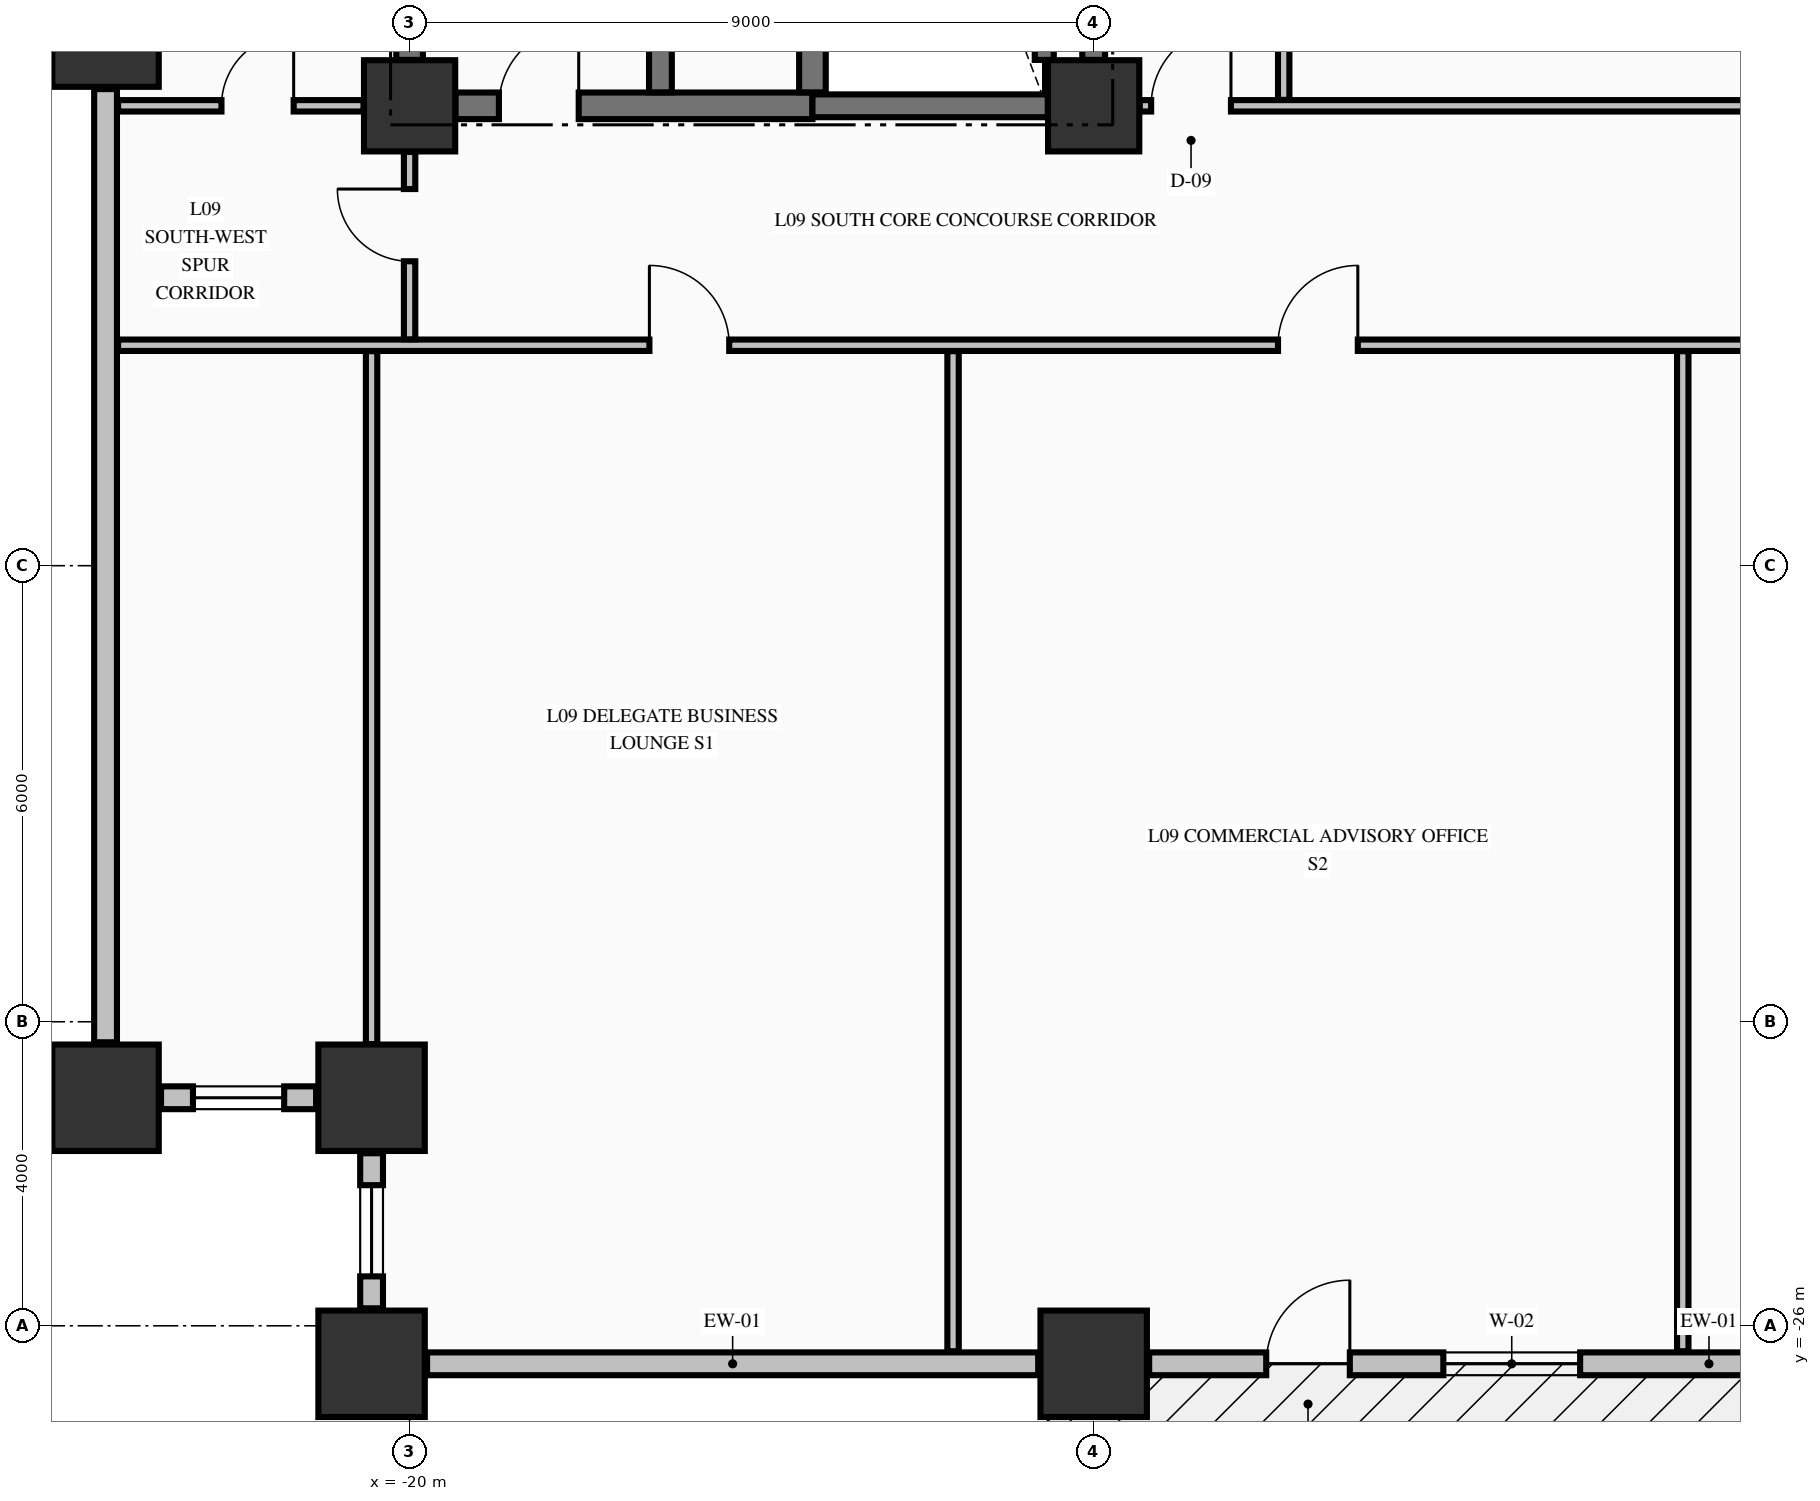
"""IFC4 building model, lengths in metres.
Left out: names, types, materials, properties, quantities, classifications, styles, units other than length and angle.
Written with IfcOpenShell. Run it as: python <this file> out.ifc"""

import sys

from ifc_helpers import new_model, si_unit, direction, frame, frame_2d, origin, origin_2d, place, context, subcontext, project, spatial, rectangle, extrude, element, fill, save


model = new_model("IFC4")
c1 = context("Model", 3, precision=1e-05, world=origin(), true_north=direction((0.0, 1.0)))
c2 = subcontext(c1, "Body", "Model", "MODEL_VIEW")
j1 = project(units=[si_unit("LENGTHUNIT", "METRE"), si_unit("PLANEANGLEUNIT", "RADIAN")], contexts=[c1])
p1 = place(None, origin())
s1 = spatial("IfcSite", under=j1, at=p1, CompositionType="ELEMENT")
p2 = place(p1, origin())
s2 = spatial("IfcBuilding", under=s1, at=p2, CompositionType="ELEMENT")
p3 = place(p2, frame((0.0, 0.0, 41.48)))
s3 = spatial("IfcBuildingStorey", under=s2, at=p3, CompositionType="ELEMENT", Elevation=41.48)
for number, where, z_axis, x_axis in (
    (1, (-20.5, -26.5, -0.25), (0.0, 0.0, 1.0), (1.0, 0.0, 0.0)),
    (2, (-11.0, -26.5, -0.25), (0.0, 0.0, 1.0), (1.0, 0.0, 0.0)),
    (3, (-24.0, -23.0, -0.25), (0.0, 0.0, 1.0), (1.0, 0.0, 0.0)),
    (4, (-24.0, -9.0, -0.25), (0.0, 0.0, 1.0), (1.0, 0.0, 0.0)),
    (5, (-20.5, -23.0, -0.25), (0.0, 0.0, 1.0), (1.0, 0.0, 0.0)),
):
    element("IfcColumn", number, at=place(p3, frame(where, z_axis=z_axis, x_axis=x_axis)), inside=s3, PredefinedType="COLUMN", context=c2, shape_type="SweptSolid", body=[
        extrude(rectangle(XDim=1.4, YDim=1.4, at=origin_2d()), origin(), (0.0, 0.0, 1.0), 3.57),
    ])
for number, where, z_axis, x_axis in (
    (6, (-20.0, -9.95, -0.25), (0.0, 0.0, 1.0), (1.0, 0.0, 0.0)),
    (7, (-11.0, -9.95, -0.25), (0.0, 0.0, 1.0), (1.0, 0.0, 0.0)),
):
    element("IfcColumn", number, at=place(p3, frame(where, z_axis=z_axis, x_axis=x_axis)), inside=s3, PredefinedType="COLUMN", context=c2, shape_type="SweptSolid", body=[
        extrude(rectangle(XDim=1.2, YDim=1.2, at=origin_2d()), origin(), (0.0, 0.0, 1.0), 3.57),
    ])
p4 = place(p3, frame((-23.27, -23.0, 0.0), z_axis=(0.0, 0.0, 1.0), x_axis=(1.0, 0.0, 0.0)))
e8 = element("IfcWall", 8, at=p4, inside=s3, PredefinedType="STANDARD", context=c2, shape_type="SweptSolid", body=[
    extrude(rectangle(XDim=2.04, YDim=0.3, at=frame_2d((1.02, 0.0))), origin(), (0.0, 0.0, 1.0), 2.712),
])
p5 = place(p4, frame((0.42, 0.0, 0.82)))
e9 = element("IfcOpeningElement", 9, at=p5, cuts=e8, PredefinedType="OPENING", context=c2, shape_type="SweptSolid", body=[
    extrude(rectangle(XDim=1.2, YDim=1.65, at=frame_2d((0.6, 0.825))), frame((0.0, 0.16, 0.0), z_axis=(0.0, -1.0, 0.0), x_axis=(1.0, 0.0, 0.0)), (0.0, 0.0, 1.0), 0.32),
])
p6 = place(p3, frame((-20.5, -23.73, 0.0), z_axis=(0.0, 0.0, 1.0), x_axis=(0.0, -1.0, 0.0)))
e10 = element("IfcWall", 10, at=p6, inside=s3, PredefinedType="STANDARD", context=c2, shape_type="SweptSolid", body=[
    extrude(rectangle(XDim=2.04, YDim=0.3, at=frame_2d((1.02, 0.0))), origin(), (0.0, 0.0, 1.0), 2.712),
])
p7 = place(p6, frame((0.42, 0.0, 0.82)))
e11 = element("IfcOpeningElement", 11, at=p7, cuts=e10, PredefinedType="OPENING", context=c2, shape_type="SweptSolid", body=[
    extrude(rectangle(XDim=1.2, YDim=1.65, at=frame_2d((0.6, 0.825))), frame((0.0, 0.16, 0.0), z_axis=(0.0, -1.0, 0.0), x_axis=(1.0, 0.0, 0.0)), (0.0, 0.0, 1.0), 0.32),
])
p8 = place(p3, frame((-19.77, -26.5, 0.0), z_axis=(0.0, 0.0, 1.0), x_axis=(1.0, 0.0, 0.0)))
e12 = element("IfcWall", 12, at=p8, inside=s3, PredefinedType="STANDARD", context=c2, shape_type="SweptSolid", body=[
    extrude(rectangle(XDim=8.04, YDim=0.3, at=frame_2d((4.02, 0.0))), origin(), (0.0, 0.0, 1.0), 2.712),
])
p9 = place(p3, frame((-10.27, -26.5, 0.0), z_axis=(0.0, 0.0, 1.0), x_axis=(1.0, 0.0, 0.0)))
e13 = element("IfcWall", 13, at=p9, inside=s3, PredefinedType="STANDARD", context=c2, shape_type="SweptSolid", body=[
    extrude(rectangle(XDim=9.54, YDim=0.3, at=frame_2d((4.77, 0.0))), origin(), (0.0, 0.0, 1.0), 2.712),
])
p10 = place(p9, frame((1.54, 0.0, 0.0)))
e14 = element("IfcOpeningElement", 14, at=p10, cuts=e13, PredefinedType="OPENING", context=c2, shape_type="SweptSolid", body=[
    extrude(rectangle(XDim=1.1, YDim=2.15, at=frame_2d((0.55, 1.075))), frame((0.0, 0.16, 0.0), z_axis=(0.0, -1.0, 0.0), x_axis=(1.0, 0.0, 0.0)), (0.0, 0.0, 1.0), 0.32),
])
p11 = place(p9, frame((3.87, 0.0, 0.78)))
e15 = element("IfcOpeningElement", 15, at=p11, cuts=e13, PredefinedType="OPENING", context=c2, shape_type="SweptSolid", body=[
    extrude(rectangle(XDim=1.8, YDim=1.72, at=frame_2d((0.9, 0.86))), frame((0.0, 0.16, 0.0), z_axis=(0.0, -1.0, 0.0), x_axis=(1.0, 0.0, 0.0)), (0.0, 0.0, 1.0), 0.32),
])
p12 = place(p3, frame((-24.0, -9.73, 0.0), z_axis=(0.0, 0.0, 1.0), x_axis=(0.0, -1.0, 0.0)))
e16 = element("IfcWall", 16, at=p12, inside=s3, PredefinedType="STANDARD", context=c2, shape_type="SweptSolid", body=[
    extrude(rectangle(XDim=12.54, YDim=0.3, at=frame_2d((6.27, 0.0))), origin(), (0.0, 0.0, 1.0), 2.712),
])
p13 = place(p3, frame((-19.396, -9.95, 0.0), z_axis=(0.0, 0.0, 1.0), x_axis=(1.0, 0.0, 0.0)))
e17 = element("IfcWall", 17, at=p13, inside=s3, PredefinedType="SHEAR", context=c2, shape_type="SweptSolid", body=[
    extrude(rectangle(XDim=4.696, YDim=0.35, at=frame_2d((2.348, 0.0))), origin(), (0.0, 0.0, 1.0), 3.32),
])
p14 = place(p13, frame((0.571, 0.0, 0.0)))
e18 = element("IfcOpeningElement", 18, at=p14, cuts=e17, PredefinedType="OPENING", context=c2, shape_type="SweptSolid", body=[
    extrude(rectangle(XDim=1.05, YDim=2.15, at=frame_2d((0.525, 1.075))), frame((0.0, 0.185, 0.0), z_axis=(0.0, -1.0, 0.0), x_axis=(1.0, 0.0, 0.0)), (0.0, 0.0, 1.0), 0.37),
])
p15 = place(p3, frame((-14.7, -9.95, 0.0), z_axis=(0.0, 0.0, 1.0), x_axis=(1.0, 0.0, 0.0)))
e19 = element("IfcWall", 19, at=p15, inside=s3, PredefinedType="SHEAR", context=c2, shape_type="SweptSolid", body=[
    extrude(rectangle(XDim=3.096, YDim=0.3, at=frame_2d((1.548, 0.0))), origin(), (0.0, 0.0, 1.0), 3.32),
])
p16 = place(p3, frame((-23.835, -13.1, 0.0), z_axis=(0.0, 0.0, 1.0), x_axis=(1.0, 0.0, 0.0)))
e20 = element("IfcWall", 20, at=p16, inside=s3, PredefinedType="PARTITIONING", context=c2, shape_type="SweptSolid", body=[
    extrude(rectangle(XDim=52.67, YDim=0.15, at=frame_2d((26.335, 0.0))), origin(), (0.0, 0.0, 1.0), 3.32),
])
p17 = place(p16, frame((6.99, 0.0, 0.0)))
e21 = element("IfcOpeningElement", 21, at=p17, cuts=e20, PredefinedType="OPENING", context=c2, shape_type="SweptSolid", body=[
    extrude(rectangle(XDim=1.05, YDim=2.15, at=frame_2d((0.525, 1.075))), frame((0.0, 0.085, 0.0), z_axis=(0.0, -1.0, 0.0), x_axis=(1.0, 0.0, 0.0)), (0.0, 0.0, 1.0), 0.17),
])
p18 = place(p16, frame((15.26, 0.0, 0.0)))
e22 = element("IfcOpeningElement", 22, at=p18, cuts=e20, PredefinedType="OPENING", context=c2, shape_type="SweptSolid", body=[
    extrude(rectangle(XDim=1.05, YDim=2.15, at=frame_2d((0.525, 1.075))), frame((0.0, 0.085, 0.0), z_axis=(0.0, -1.0, 0.0), x_axis=(1.0, 0.0, 0.0)), (0.0, 0.0, 1.0), 0.17),
])
p19 = place(p16, frame((25.06, 0.0, 0.0)))
e23 = element("IfcOpeningElement", 23, at=p19, cuts=e20, PredefinedType="OPENING", context=c2, shape_type="SweptSolid", body=[
    extrude(rectangle(XDim=1.05, YDim=2.15, at=frame_2d((0.525, 1.075))), frame((0.0, 0.085, 0.0), z_axis=(0.0, -1.0, 0.0), x_axis=(1.0, 0.0, 0.0)), (0.0, 0.0, 1.0), 0.17),
])
p20 = place(p16, frame((36.59, 0.0, 0.0)))
e24 = element("IfcOpeningElement", 24, at=p20, cuts=e20, PredefinedType="OPENING", context=c2, shape_type="SweptSolid", body=[
    extrude(rectangle(XDim=1.05, YDim=2.15, at=frame_2d((0.525, 1.075))), frame((0.0, 0.085, 0.0), z_axis=(0.0, -1.0, 0.0), x_axis=(1.0, 0.0, 0.0)), (0.0, 0.0, 1.0), 0.17),
])
p21 = place(p3, frame((-23.835, -9.95, 0.0), z_axis=(0.0, 0.0, 1.0), x_axis=(1.0, 0.0, 0.0)))
e25 = element("IfcWall", 25, at=p21, inside=s3, PredefinedType="PARTITIONING", context=c2, shape_type="SweptSolid", body=[
    extrude(rectangle(XDim=3.229, YDim=0.15, at=frame_2d((1.615, 0.0))), origin(), (0.0, 0.0, 1.0), 3.32),
])
p22 = place(p21, frame((1.36, 0.0, 0.0)))
e26 = element("IfcOpeningElement", 26, at=p22, cuts=e25, PredefinedType="OPENING", context=c2, shape_type="SweptSolid", body=[
    extrude(rectangle(XDim=0.95, YDim=2.15, at=frame_2d((0.475, 1.075))), frame((0.0, 0.085, 0.0), z_axis=(0.0, -1.0, 0.0), x_axis=(1.0, 0.0, 0.0)), (0.0, 0.0, 1.0), 0.17),
])
p23 = place(p3, frame((-10.394, -9.95, 0.0), z_axis=(0.0, 0.0, 1.0), x_axis=(1.0, 0.0, 0.0)))
e27 = element("IfcWall", 27, at=p23, inside=s3, PredefinedType="PARTITIONING", context=c2, shape_type="SweptSolid", body=[
    extrude(rectangle(XDim=20.788, YDim=0.15, at=frame_2d((10.394, 0.0))), origin(), (0.0, 0.0, 1.0), 3.32),
])
p24 = place(p23, frame((0.15, 0.0, 0.0)))
e28 = element("IfcOpeningElement", 28, at=p24, cuts=e27, PredefinedType="OPENING", context=c2, shape_type="SweptSolid", body=[
    extrude(rectangle(XDim=1.05, YDim=2.15, at=frame_2d((0.525, 1.075))), frame((0.0, 0.085, 0.0), z_axis=(0.0, -1.0, 0.0), x_axis=(1.0, 0.0, 0.0)), (0.0, 0.0, 1.0), 0.17),
])
p25 = place(p23, frame((19.588, 0.0, 0.0)))
e29 = element("IfcOpeningElement", 29, at=p25, cuts=e27, PredefinedType="OPENING", context=c2, shape_type="SweptSolid", body=[
    extrude(rectangle(XDim=1.05, YDim=2.15, at=frame_2d((0.525, 1.075))), frame((0.0, 0.085, 0.0), z_axis=(0.0, -1.0, 0.0), x_axis=(1.0, 0.0, 0.0)), (0.0, 0.0, 1.0), 0.17),
])
p26 = place(p23, frame((12.669, 0.0, 0.0)))
e30 = element("IfcOpeningElement", 30, at=p26, cuts=e27, PredefinedType="OPENING", context=c2, shape_type="SweptSolid", body=[
    extrude(rectangle(XDim=0.95, YDim=2.15, at=frame_2d((0.475, 1.075))), frame((0.0, 0.085, 0.0), z_axis=(0.0, -1.0, 0.0), x_axis=(1.0, 0.0, 0.0)), (0.0, 0.0, 1.0), 0.17),
])
p27 = place(p3, frame((-20.0, -9.346, 0.0), z_axis=(0.0, 0.0, 1.0), x_axis=(0.0, 1.0, 0.0)))
e31 = element("IfcWall", 31, at=p27, inside=s3, PredefinedType="SHEAR", context=c2, shape_type="SweptSolid", body=[
    extrude(rectangle(XDim=8.742, YDim=0.35, at=frame_2d((4.371, 0.0))), origin(), (0.0, 0.0, 1.0), 3.32),
])
p28 = place(p3, frame((-16.7, -9.773, 0.0), z_axis=(0.0, 0.0, 1.0), x_axis=(0.0, 1.0, 0.0)))
e32 = element("IfcWall", 32, at=p28, inside=s3, PredefinedType="SHEAR", context=c2, shape_type="SweptSolid", body=[
    extrude(rectangle(XDim=9.371, YDim=0.3, at=frame_2d((4.686, 0.0))), origin(), (0.0, 0.0, 1.0), 3.32),
])
p29 = place(p3, frame((-14.7, -9.773, 0.0), z_axis=(0.0, 0.0, 1.0), x_axis=(0.0, 1.0, 0.0)))
e33 = element("IfcWall", 33, at=p29, inside=s3, PredefinedType="SHEAR", context=c2, shape_type="SweptSolid", body=[
    extrude(rectangle(XDim=9.371, YDim=0.35, at=frame_2d((4.686, 0.0))), origin(), (0.0, 0.0, 1.0), 3.32),
])
p30 = place(p3, frame((-11.65, -9.346, 0.0), z_axis=(0.0, 0.0, 1.0), x_axis=(0.0, 1.0, 0.0)))
e34 = element("IfcWall", 34, at=p30, inside=s3, PredefinedType="SOLIDWALL", context=c2, shape_type="SweptSolid", body=[
    extrude(rectangle(XDim=8.742, YDim=0.25, at=frame_2d((4.371, 0.0))), origin(), (0.0, 0.0, 1.0), 3.32),
])
p31 = place(p3, frame((-11.0, -9.346, 0.0), z_axis=(0.0, 0.0, 1.0), x_axis=(0.0, 1.0, 0.0)))
e35 = element("IfcWall", 35, at=p31, inside=s3, PredefinedType="SHEAR", context=c2, shape_type="SweptSolid", body=[
    extrude(rectangle(XDim=8.742, YDim=0.3, at=frame_2d((4.371, 0.0))), origin(), (0.0, 0.0, 1.0), 3.32),
])
p32 = place(p3, frame((-20.5, -22.294, 0.0), z_axis=(0.0, 0.0, 1.0), x_axis=(0.0, 1.0, 0.0)))
e36 = element("IfcWall", 36, at=p32, inside=s3, PredefinedType="PARTITIONING", context=c2, shape_type="SweptSolid", body=[
    extrude(rectangle(XDim=9.116, YDim=0.15, at=frame_2d((4.558, 0.0))), origin(), (0.0, 0.0, 1.0), 3.32),
])
p33 = place(p3, frame((-20.0, -13.022, 0.0), z_axis=(0.0, 0.0, 1.0), x_axis=(0.0, 1.0, 0.0)))
e37 = element("IfcWall", 37, at=p33, inside=s3, PredefinedType="PARTITIONING", context=c2, shape_type="SweptSolid", body=[
    extrude(rectangle(XDim=2.466, YDim=0.15, at=frame_2d((1.233, 0.0))), origin(), (0.0, 0.0, 1.0), 3.32),
])
p34 = place(p33, frame((1.027, 0.0, 0.0)))
e38 = element("IfcOpeningElement", 38, at=p34, cuts=e37, PredefinedType="OPENING", context=c2, shape_type="SweptSolid", body=[
    extrude(rectangle(XDim=0.95, YDim=2.15, at=frame_2d((0.475, 1.075))), frame((0.0, 0.085, 0.0), z_axis=(0.0, -1.0, 0.0), x_axis=(1.0, 0.0, 0.0)), (0.0, 0.0, 1.0), 0.17),
])
p35 = place(p3, frame((-12.85, -26.335, 0.0), z_axis=(0.0, 0.0, 1.0), x_axis=(0.0, 1.0, 0.0)))
e39 = element("IfcWall", 39, at=p35, inside=s3, PredefinedType="PARTITIONING", context=c2, shape_type="SweptSolid", body=[
    extrude(rectangle(XDim=13.157, YDim=0.15, at=frame_2d((6.579, 0.0))), origin(), (0.0, 0.0, 1.0), 3.32),
])
p36 = place(p3, frame((-8.5, -9.872, 0.0), z_axis=(0.0, 0.0, 1.0), x_axis=(0.0, 1.0, 0.0)))
e40 = element("IfcWall", 40, at=p36, inside=s3, PredefinedType="PARTITIONING", context=c2, shape_type="SweptSolid", body=[
    extrude(rectangle(XDim=13.369, YDim=0.15, at=frame_2d((6.685, 0.0))), origin(), (0.0, 0.0, 1.0), 3.32),
])
p37 = place(p36, frame((6.227, 0.0, 0.0)))
e41 = element("IfcOpeningElement", 41, at=p37, cuts=e40, PredefinedType="OPENING", context=c2, shape_type="SweptSolid", body=[
    extrude(rectangle(XDim=0.95, YDim=2.15, at=frame_2d((0.475, 1.075))), frame((0.0, 0.085, 0.0), z_axis=(0.0, -1.0, 0.0), x_axis=(1.0, 0.0, 0.0)), (0.0, 0.0, 1.0), 0.17),
])
p38 = place(p3, frame((-3.25, -26.335, 0.0), z_axis=(0.0, 0.0, 1.0), x_axis=(0.0, 1.0, 0.0)))
e42 = element("IfcWall", 42, at=p38, inside=s3, PredefinedType="PARTITIONING", context=c2, shape_type="SweptSolid", body=[
    extrude(rectangle(XDim=13.157, YDim=0.15, at=frame_2d((6.579, 0.0))), origin(), (0.0, 0.0, 1.0), 3.32),
])
p39 = place(p5, origin())
e43 = element("IfcWindow", 43, at=p39, inside=s3, PartitioningType="SINGLE_PANEL", PredefinedType="WINDOW", context=c2, shape_type="SweptSolid", body=[
    extrude(rectangle(XDim=1.2, YDim=1.65, at=frame_2d((0.6, 0.825))), frame((0.0, 0.03, 0.0), z_axis=(0.0, -1.0, 0.0), x_axis=(1.0, 0.0, 0.0)), (0.0, 0.0, 1.0), 0.06),
])
fill(e9, e43)
p40 = place(p7, origin())
e44 = element("IfcWindow", 44, at=p40, inside=s3, PartitioningType="SINGLE_PANEL", PredefinedType="WINDOW", context=c2, shape_type="SweptSolid", body=[
    extrude(rectangle(XDim=1.2, YDim=1.65, at=frame_2d((0.6, 0.825))), frame((0.0, 0.03, 0.0), z_axis=(0.0, -1.0, 0.0), x_axis=(1.0, 0.0, 0.0)), (0.0, 0.0, 1.0), 0.06),
])
fill(e11, e44)
p41 = place(p10, origin())
e45 = element("IfcDoor", 45, at=p41, inside=s3, OperationType="SINGLE_SWING_RIGHT", PredefinedType="DOOR", context=c2, shape_type="SweptSolid", body=[
    extrude(rectangle(XDim=1.1, YDim=2.15, at=frame_2d((0.55, 1.075))), frame((0.0, 0.025, 0.0), z_axis=(0.0, -1.0, 0.0), x_axis=(1.0, 0.0, 0.0)), (0.0, 0.0, 1.0), 0.05),
])
fill(e14, e45)
p42 = place(p11, origin())
e46 = element("IfcWindow", 46, at=p42, inside=s3, PartitioningType="SINGLE_PANEL", PredefinedType="WINDOW", context=c2, shape_type="SweptSolid", body=[
    extrude(rectangle(XDim=1.8, YDim=1.72, at=frame_2d((0.9, 0.86))), frame((0.0, 0.03, 0.0), z_axis=(0.0, -1.0, 0.0), x_axis=(1.0, 0.0, 0.0)), (0.0, 0.0, 1.0), 0.06),
])
fill(e15, e46)
p43 = place(p14, origin())
e47 = element("IfcDoor", 47, at=p43, inside=s3, OperationType="SINGLE_SWING_RIGHT", PredefinedType="DOOR", context=c2, shape_type="SweptSolid", body=[
    extrude(rectangle(XDim=1.05, YDim=2.15, at=frame_2d((0.525, 1.075))), frame((0.0, 0.025, 0.0), z_axis=(0.0, -1.0, 0.0), x_axis=(1.0, 0.0, 0.0)), (0.0, 0.0, 1.0), 0.05),
])
fill(e18, e47)
p44 = place(p24, origin())
e48 = element("IfcDoor", 48, at=p44, inside=s3, OperationType="SINGLE_SWING_RIGHT", PredefinedType="DOOR", context=c2, shape_type="SweptSolid", body=[
    extrude(rectangle(XDim=1.05, YDim=2.15, at=frame_2d((0.525, 1.075))), frame((0.0, 0.025, 0.0), z_axis=(0.0, -1.0, 0.0), x_axis=(1.0, 0.0, 0.0)), (0.0, 0.0, 1.0), 0.05),
])
fill(e28, e48)
p45 = place(p17, origin())
e49 = element("IfcDoor", 49, at=p45, inside=s3, OperationType="SINGLE_SWING_LEFT", PredefinedType="DOOR", context=c2, shape_type="SweptSolid", body=[
    extrude(rectangle(XDim=1.05, YDim=2.15, at=frame_2d((0.525, 1.075))), frame((0.0, 0.025, 0.0), z_axis=(0.0, -1.0, 0.0), x_axis=(1.0, 0.0, 0.0)), (0.0, 0.0, 1.0), 0.05),
])
fill(e21, e49)
p46 = place(p18, origin())
e50 = element("IfcDoor", 50, at=p46, inside=s3, OperationType="SINGLE_SWING_RIGHT", PredefinedType="DOOR", context=c2, shape_type="SweptSolid", body=[
    extrude(rectangle(XDim=1.05, YDim=2.15, at=frame_2d((0.525, 1.075))), frame((0.0, 0.025, 0.0), z_axis=(0.0, -1.0, 0.0), x_axis=(1.0, 0.0, 0.0)), (0.0, 0.0, 1.0), 0.05),
])
fill(e22, e50)
p47 = place(p34, origin())
e51 = element("IfcDoor", 51, at=p47, inside=s3, OperationType="SINGLE_SWING_RIGHT", PredefinedType="DOOR", context=c2, shape_type="SweptSolid", body=[
    extrude(rectangle(XDim=0.95, YDim=2.15, at=frame_2d((0.475, 1.075))), frame((0.0, 0.025, 0.0), z_axis=(0.0, -1.0, 0.0), x_axis=(1.0, 0.0, 0.0)), (0.0, 0.0, 1.0), 0.05),
])
fill(e38, e51)
p48 = place(p22, origin())
e52 = element("IfcDoor", 52, at=p48, inside=s3, OperationType="SINGLE_SWING_RIGHT", PredefinedType="DOOR", context=c2, shape_type="SweptSolid", body=[
    extrude(rectangle(XDim=0.95, YDim=2.15, at=frame_2d((0.475, 1.075))), frame((0.0, 0.025, 0.0), z_axis=(0.0, -1.0, 0.0), x_axis=(1.0, 0.0, 0.0)), (0.0, 0.0, 1.0), 0.05),
])
fill(e26, e52)
save(model, sys.argv[1])
